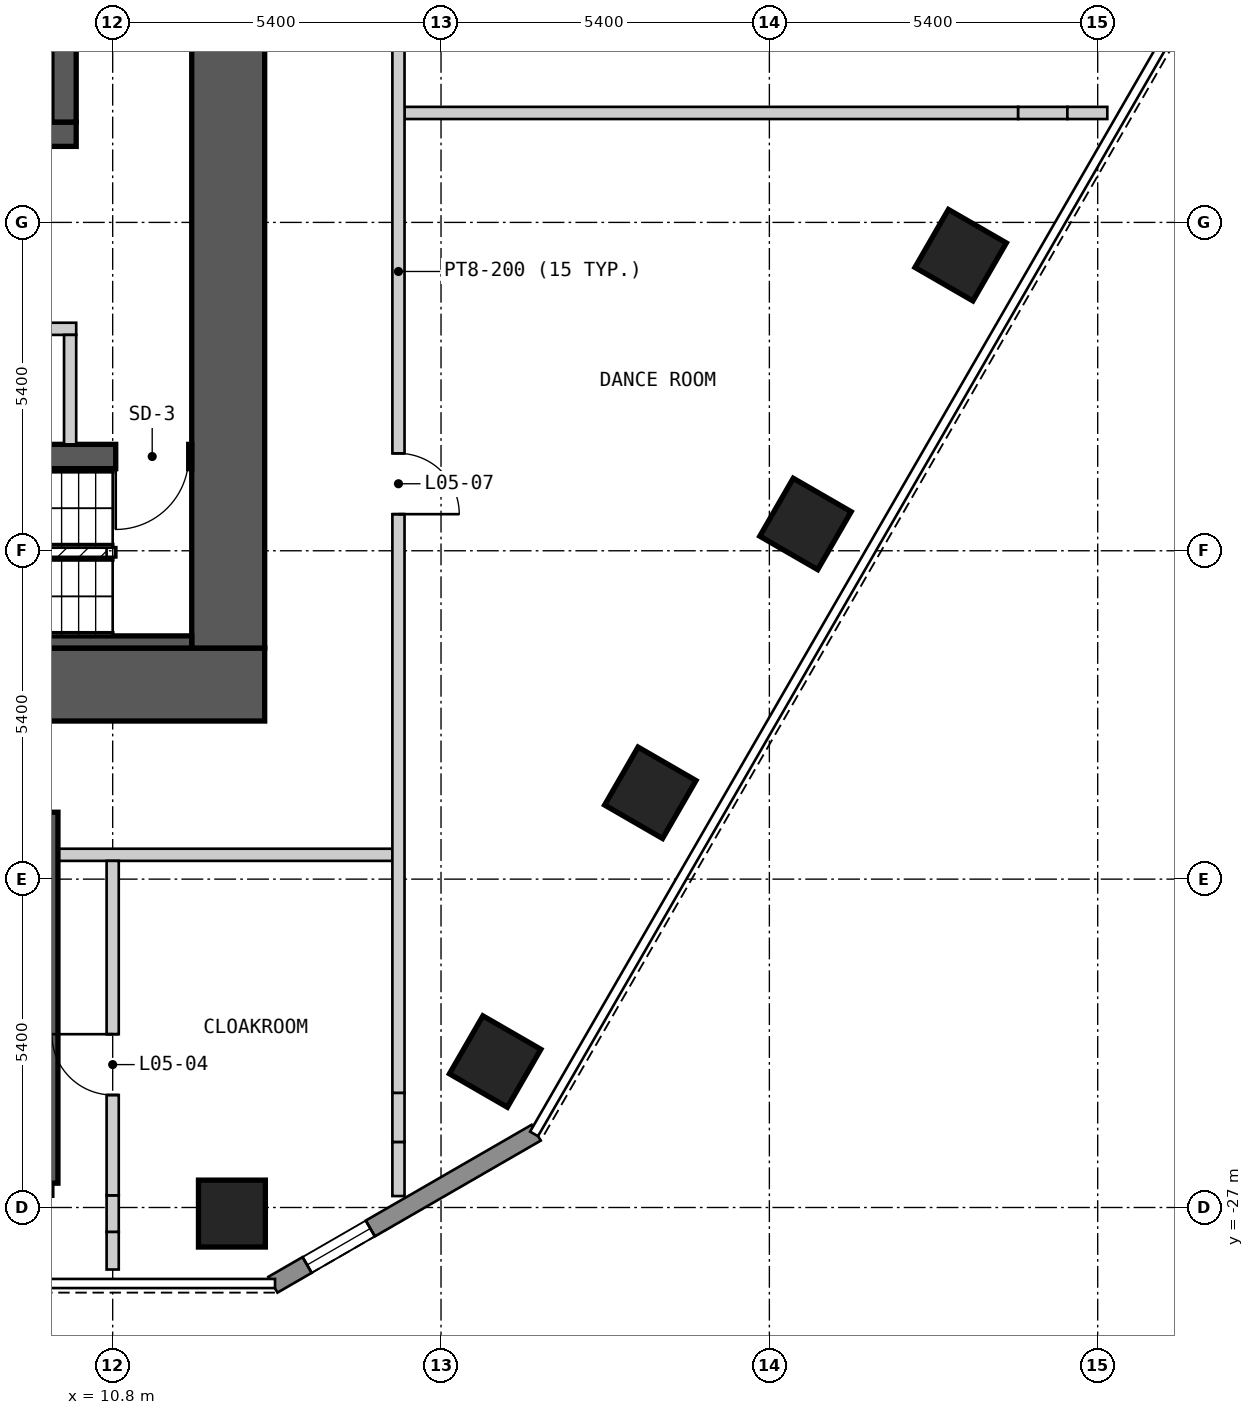
"""IFC4 building model, lengths in metres.
Left out: names, types, materials, properties, quantities, classifications, styles, units other than length and angle.
Written with IfcOpenShell. Run it as: python <this file> out.ifc"""

import sys

from ifc_helpers import new_model, si_unit, direction, frame, frame_2d, origin, origin_2d, place, context, subcontext, project, spatial, polyline, rectangle, outline, extrude, element, fill, save


model = new_model("IFC4")
c1 = context("Model", 3, precision=1e-05, world=origin(), true_north=direction((0.0, 1.0)))
c2 = subcontext(c1, "Body", "Model", "MODEL_VIEW")
j1 = project(units=[si_unit("LENGTHUNIT", "METRE"), si_unit("PLANEANGLEUNIT", "RADIAN")], contexts=[c1])
p1 = place(None, origin())
s1 = spatial("IfcSite", under=j1, at=p1, CompositionType="ELEMENT")
p2 = place(p1, origin())
s2 = spatial("IfcBuilding", under=s1, at=p2, CompositionType="ELEMENT")
p3 = place(p2, frame((0.0, 0.0, 19.8)))
s3 = spatial("IfcBuildingStorey", under=s2, at=p3, CompositionType="ELEMENT", Elevation=19.8)
for number, where, z_axis, x_axis in (
    (1, (12.761, -27.1, 0.0), (0.0, 0.0, 1.0), (1.0, 0.0, 0.0)),
    (2, (17.09, -24.6, 0.0), (0.0, 0.0, 1.0), (0.5, 0.866, 0.0)),
    (3, (19.642, -20.18, 0.0), (0.0, 0.0, 1.0), (0.5, 0.866, 0.0)),
    (4, (22.194, -15.759, 0.0), (0.0, 0.0, 1.0), (0.5, 0.866, 0.0)),
    (5, (24.746, -11.339, 0.0), (0.0, 0.0, 1.0), (0.5, 0.866, 0.0)),
):
    element("IfcColumn", number, at=place(p3, frame(where, z_axis=z_axis, x_axis=x_axis)), inside=s3, PredefinedType="COLUMN", context=c2, shape_type="SweptSolid", body=[
        extrude(rectangle(XDim=1.1, YDim=1.1, at=origin_2d()), origin(), (0.0, 0.0, 1.0), 3.6),
    ])
p4 = place(p3, frame((-13.3, -18.4, 0.0), z_axis=(0.0, 0.0, 1.0), x_axis=(1.0, 0.0, 0.0)))
e6 = element("IfcWall", 6, at=p4, inside=s3, PredefinedType="SHEAR", context=c2, shape_type="SweptSolid", body=[
    extrude(rectangle(XDim=26.6, YDim=1.2, at=frame_2d((13.3, 0.0))), origin(), (0.0, 0.0, 1.0), 2.8),
])
p5 = place(p3, frame((12.7, -17.8, 0.0), z_axis=(0.0, 0.0, 1.0), x_axis=(0.0, 1.0, 0.0)))
e7 = element("IfcWall", 7, at=p5, inside=s3, PredefinedType="SHEAR", context=c2, shape_type="SweptSolid", body=[
    extrude(rectangle(XDim=11.6, YDim=1.2, at=frame_2d((5.8, 0.0))), origin(), (0.0, 0.0, 1.0), 2.8),
])
p6 = place(p3, frame((-12.1, -14.65, 0.0), z_axis=(0.0, 0.0, 1.0), x_axis=(1.0, 0.0, 0.0)))
e8 = element("IfcWall", 8, at=p6, inside=s3, PredefinedType="SHEAR", context=c2, shape_type="SweptSolid", body=[
    extrude(rectangle(XDim=24.2, YDim=0.4, at=frame_2d((12.1, 0.0))), origin(), (0.0, 0.0, 1.0), 2.8),
])
p7 = place(p6, frame((1.3, 0.0, 0.0), z_axis=(0.0, 0.0, 1.0), x_axis=(-1.0, 0.0, 0.0)))
e9 = element("IfcOpeningElement", 9, at=p7, cuts=e8, PredefinedType="OPENING", context=c2, shape_type="SweptSolid", body=[
    extrude(rectangle(XDim=1.2, YDim=2.1, at=frame_2d((0.6, 1.05))), frame((0.0, 0.21, 0.0), z_axis=(0.0, -1.0, 0.0), x_axis=(1.0, 0.0, 0.0)), (0.0, 0.0, 1.0), 0.42),
])
p8 = place(p6, frame((24.15, 0.0, 0.0), z_axis=(0.0, 0.0, 1.0), x_axis=(-1.0, 0.0, 0.0)))
e10 = element("IfcOpeningElement", 10, at=p8, cuts=e8, PredefinedType="OPENING", context=c2, shape_type="SweptSolid", body=[
    extrude(rectangle(XDim=1.2, YDim=2.1, at=frame_2d((0.6, 1.05))), frame((0.0, 0.21, 0.0), z_axis=(0.0, -1.0, 0.0), x_axis=(1.0, 0.0, 0.0)), (0.0, 0.0, 1.0), 0.42),
])
p9 = place(p6, frame((16.25, 0.0, 0.0), z_axis=(0.0, 0.0, 1.0), x_axis=(-1.0, 0.0, 0.0)))
e11 = element("IfcOpeningElement", 11, at=p9, cuts=e8, PredefinedType="OPENING", context=c2, shape_type="SweptSolid", body=[
    extrude(rectangle(XDim=0.9, YDim=2.1, at=frame_2d((0.45, 1.05))), frame((0.0, 0.21, 0.0), z_axis=(0.0, -1.0, 0.0), x_axis=(1.0, 0.0, 0.0)), (0.0, 0.0, 1.0), 0.42),
])
p10 = place(p6, frame((18.05, 0.0, 0.0), z_axis=(0.0, 0.0, 1.0), x_axis=(-1.0, 0.0, 0.0)))
e12 = element("IfcOpeningElement", 12, at=p10, cuts=e8, PredefinedType="OPENING", context=c2, shape_type="SweptSolid", body=[
    extrude(rectangle(XDim=0.9, YDim=2.1, at=frame_2d((0.45, 1.05))), frame((0.0, 0.21, 0.0), z_axis=(0.0, -1.0, 0.0), x_axis=(1.0, 0.0, 0.0)), (0.0, 0.0, 1.0), 0.42),
])
p11 = place(p3, frame((-12.1, -9.35, 0.0), z_axis=(0.0, 0.0, 1.0), x_axis=(1.0, 0.0, 0.0)))
e13 = element("IfcWall", 13, at=p11, inside=s3, PredefinedType="SHEAR", context=c2, shape_type="SweptSolid", body=[
    extrude(rectangle(XDim=22.3, YDim=0.4, at=frame_2d((11.15, 0.0))), origin(), (0.0, 0.0, 1.0), 2.8),
])
p12 = place(p11, frame((0.7, 0.0, 0.0)))
e14 = element("IfcOpeningElement", 14, at=p12, cuts=e13, PredefinedType="OPENING", context=c2, shape_type="SweptSolid", body=[
    extrude(rectangle(XDim=1.1, YDim=2.1, at=frame_2d((0.55, 1.05))), frame((0.0, 0.21, 0.0), z_axis=(0.0, -1.0, 0.0), x_axis=(1.0, 0.0, 0.0)), (0.0, 0.0, 1.0), 0.42),
])
p13 = place(p11, frame((3.5, 0.0, 0.0)))
e15 = element("IfcOpeningElement", 15, at=p13, cuts=e13, PredefinedType="OPENING", context=c2, shape_type="SweptSolid", body=[
    extrude(rectangle(XDim=1.1, YDim=2.1, at=frame_2d((0.55, 1.05))), frame((0.0, 0.21, 0.0), z_axis=(0.0, -1.0, 0.0), x_axis=(1.0, 0.0, 0.0)), (0.0, 0.0, 1.0), 0.42),
])
p14 = place(p11, frame((6.3, 0.0, 0.0)))
e16 = element("IfcOpeningElement", 16, at=p14, cuts=e13, PredefinedType="OPENING", context=c2, shape_type="SweptSolid", body=[
    extrude(rectangle(XDim=1.1, YDim=2.1, at=frame_2d((0.55, 1.05))), frame((0.0, 0.21, 0.0), z_axis=(0.0, -1.0, 0.0), x_axis=(1.0, 0.0, 0.0)), (0.0, 0.0, 1.0), 0.42),
])
p15 = place(p11, frame((8.6, 0.0, 0.0)))
e17 = element("IfcOpeningElement", 17, at=p15, cuts=e13, PredefinedType="OPENING", context=c2, shape_type="SweptSolid", body=[
    extrude(rectangle(XDim=1.1, YDim=2.1, at=frame_2d((0.55, 1.05))), frame((0.0, 0.21, 0.0), z_axis=(0.0, -1.0, 0.0), x_axis=(1.0, 0.0, 0.0)), (0.0, 0.0, 1.0), 0.42),
])
p16 = place(p11, frame((10.9, 0.0, 0.0)))
e18 = element("IfcOpeningElement", 18, at=p16, cuts=e13, PredefinedType="OPENING", context=c2, shape_type="SweptSolid", body=[
    extrude(rectangle(XDim=1.1, YDim=2.1, at=frame_2d((0.55, 1.05))), frame((0.0, 0.21, 0.0), z_axis=(0.0, -1.0, 0.0), x_axis=(1.0, 0.0, 0.0)), (0.0, 0.0, 1.0), 0.42),
])
p17 = place(p11, frame((13.2, 0.0, 0.0)))
e19 = element("IfcOpeningElement", 19, at=p17, cuts=e13, PredefinedType="OPENING", context=c2, shape_type="SweptSolid", body=[
    extrude(rectangle(XDim=1.1, YDim=2.1, at=frame_2d((0.55, 1.05))), frame((0.0, 0.21, 0.0), z_axis=(0.0, -1.0, 0.0), x_axis=(1.0, 0.0, 0.0)), (0.0, 0.0, 1.0), 0.42),
])
p18 = place(p11, frame((15.5, 0.0, 0.0)))
e20 = element("IfcOpeningElement", 20, at=p18, cuts=e13, PredefinedType="OPENING", context=c2, shape_type="SweptSolid", body=[
    extrude(rectangle(XDim=1.1, YDim=2.1, at=frame_2d((0.55, 1.05))), frame((0.0, 0.21, 0.0), z_axis=(0.0, -1.0, 0.0), x_axis=(1.0, 0.0, 0.0)), (0.0, 0.0, 1.0), 0.42),
])
p19 = place(p11, frame((17.8, 0.0, 0.0)))
e21 = element("IfcOpeningElement", 21, at=p19, cuts=e13, PredefinedType="OPENING", context=c2, shape_type="SweptSolid", body=[
    extrude(rectangle(XDim=1.1, YDim=2.1, at=frame_2d((0.55, 1.05))), frame((0.0, 0.21, 0.0), z_axis=(0.0, -1.0, 0.0), x_axis=(1.0, 0.0, 0.0)), (0.0, 0.0, 1.0), 0.42),
])
p20 = place(p11, frame((20.2, 0.0, 0.0)))
e22 = element("IfcOpeningElement", 22, at=p20, cuts=e13, PredefinedType="OPENING", context=c2, shape_type="SweptSolid", body=[
    extrude(rectangle(XDim=1.1, YDim=2.1, at=frame_2d((0.55, 1.05))), frame((0.0, 0.21, 0.0), z_axis=(0.0, -1.0, 0.0), x_axis=(1.0, 0.0, 0.0)), (0.0, 0.0, 1.0), 0.42),
])
p21 = place(p3, frame((10.0, -9.15, 0.0), z_axis=(0.0, 0.0, 1.0), x_axis=(0.0, 1.0, 0.0)))
e23 = element("IfcWall", 23, at=p21, inside=s3, PredefinedType="SHEAR", context=c2, shape_type="SweptSolid", body=[
    extrude(rectangle(XDim=2.95, YDim=0.4, at=frame_2d((1.475, 0.0))), origin(), (0.0, 0.0, 1.0), 2.8),
])
p22 = place(p3, frame((13.435, -28.27, 0.0), z_axis=(0.0, 0.0, 1.0), x_axis=(0.866010750942, 0.50002537861, 0.0)))
e24 = element("IfcWall", 24, at=p22, inside=s3, PredefinedType="SOLIDWALL", context=c2, shape_type="SweptSolid", body=[
    extrude(outline(polyline([(0.0, -0.15), (5.0, -0.15), (4.919, 0.15), (0.08, 0.15), (0.0, -0.15)])), origin(), (0.0, 0.0, 1.0), 2.8),
])
p23 = place(p22, frame((0.65, 0.0, 0.15)))
e25 = element("IfcOpeningElement", 25, at=p23, cuts=e24, PredefinedType="OPENING", context=c2, shape_type="SweptSolid", body=[
    extrude(rectangle(XDim=1.2, YDim=2.1, at=frame_2d((0.6, 1.05))), frame((0.0, 0.16, 0.0), z_axis=(0.0, -1.0, 0.0), x_axis=(1.0, 0.0, 0.0)), (0.0, 0.0, 1.0), 0.32),
])
p24 = place(p3, frame((5.65, -26.7, 0.0), z_axis=(0.0, 0.0, 1.0), x_axis=(1.0, 0.0, 0.0)))
e26 = element("IfcWall", 26, at=p24, inside=s3, PredefinedType="SOLIDWALL", context=c2, shape_type="SweptSolid", body=[
    extrude(rectangle(XDim=4.15, YDim=0.2, at=frame_2d((2.075, 0.0))), origin(), (0.0, 0.0, 1.0), 2.8),
])
p25 = place(p3, frame((9.7, -21.2, 0.0), z_axis=(0.0, 0.0, 1.0), x_axis=(1.0, 0.0, 0.0)))
e27 = element("IfcWall", 27, at=p25, inside=s3, PredefinedType="PARTITIONING", context=c2, shape_type="SweptSolid", body=[
    extrude(rectangle(XDim=5.7, YDim=0.2, at=frame_2d((2.85, 0.0))), origin(), (0.0, 0.0, 1.0), 2.8),
])
p26 = place(p3, frame((15.6, -9.0, 0.0), z_axis=(0.0, 0.0, 1.0), x_axis=(1.0, 0.0, 0.0)))
e28 = element("IfcWall", 28, at=p26, inside=s3, PredefinedType="PARTITIONING", context=c2, shape_type="SweptSolid", body=[
    extrude(rectangle(XDim=10.092, YDim=0.2, at=frame_2d((5.046, 0.0))), origin(), (0.0, 0.0, 1.0), 2.8),
])
p27 = place(p3, frame((25.692, -9.0, 0.0), z_axis=(0.0, 0.0, 1.0), x_axis=(1.0, 0.0, 0.0)))
e29 = element("IfcWall", 29, at=p27, inside=s3, PredefinedType="PARTITIONING", context=c2, shape_type="SweptSolid", body=[
    extrude(rectangle(XDim=0.809, YDim=0.2, at=frame_2d((0.405, 0.0))), origin(), (0.0, 0.0, 1.0), 2.07),
])
p28 = place(p3, frame((26.501, -9.0, 0.0), z_axis=(0.0, 0.0, 1.0), x_axis=(1.0, 0.0, 0.0)))
e30 = element("IfcWall", 30, at=p28, inside=s3, PredefinedType="PARTITIONING", context=c2, shape_type="SweptSolid", body=[
    extrude(rectangle(XDim=0.657, YDim=0.2, at=frame_2d((0.329, 0.0))), origin(), (0.0, 0.0, 1.0), 2.8),
])
p29 = place(p3, frame((9.8, -26.6, 0.0), z_axis=(0.0, 0.0, 1.0), x_axis=(0.0, 1.0, 0.0)))
e31 = element("IfcWall", 31, at=p29, inside=s3, PredefinedType="SOLIDWALL", context=c2, shape_type="SweptSolid", body=[
    extrude(rectangle(XDim=6.1, YDim=0.2, at=frame_2d((3.05, 0.0))), origin(), (0.0, 0.0, 1.0), 2.8),
])
p30 = place(p3, frame((10.8, -28.02, 0.0), z_axis=(0.0, 0.0, 1.0), x_axis=(0.0, 1.0, 0.0)))
e32 = element("IfcWall", 32, at=p30, inside=s3, PredefinedType="PARTITIONING", context=c2, shape_type="SweptSolid", body=[
    extrude(rectangle(XDim=0.62, YDim=0.2, at=frame_2d((0.31, 0.0))), origin(), (0.0, 0.0, 1.0), 2.8),
])
p31 = place(p3, frame((10.8, -27.4, 0.0), z_axis=(0.0, 0.0, 1.0), x_axis=(0.0, 1.0, 0.0)))
e33 = element("IfcWall", 33, at=p31, inside=s3, PredefinedType="PARTITIONING", context=c2, shape_type="SweptSolid", body=[
    extrude(rectangle(XDim=0.6, YDim=0.2, at=frame_2d((0.3, 0.0))), origin(), (0.0, 0.0, 1.0), 2.07),
])
p32 = place(p3, frame((10.8, -26.8, 0.0), z_axis=(0.0, 0.0, 1.0), x_axis=(0.0, 1.0, 0.0)))
e34 = element("IfcWall", 34, at=p32, inside=s3, PredefinedType="PARTITIONING", context=c2, shape_type="SweptSolid", body=[
    extrude(rectangle(XDim=5.5, YDim=0.2, at=frame_2d((2.75, 0.0))), origin(), (0.0, 0.0, 1.0), 2.8),
])
p33 = place(p32, frame((2.65, 0.0, 0.0), z_axis=(0.0, 0.0, 1.0), x_axis=(-1.0, 0.0, 0.0)))
e35 = element("IfcOpeningElement", 35, at=p33, cuts=e34, PredefinedType="OPENING", context=c2, shape_type="SweptSolid", body=[
    extrude(rectangle(XDim=1.0, YDim=2.1, at=frame_2d((0.5, 1.05))), frame((0.0, 0.11, 0.0), z_axis=(0.0, -1.0, 0.0), x_axis=(1.0, 0.0, 0.0)), (0.0, 0.0, 1.0), 0.22),
])
p34 = place(p3, frame((15.5, -26.812, 0.0), z_axis=(0.0, 0.0, 1.0), x_axis=(0.0, 1.0, 0.0)))
e36 = element("IfcWall", 36, at=p34, inside=s3, PredefinedType="PARTITIONING", context=c2, shape_type="SweptSolid", body=[
    extrude(rectangle(XDim=0.89, YDim=0.2, at=frame_2d((0.445, 0.0))), origin(), (0.0, 0.0, 1.0), 2.8),
])
p35 = place(p3, frame((15.5, -25.922, 0.0), z_axis=(0.0, 0.0, 1.0), x_axis=(0.0, 1.0, 0.0)))
e37 = element("IfcWall", 37, at=p35, inside=s3, PredefinedType="PARTITIONING", context=c2, shape_type="SweptSolid", body=[
    extrude(rectangle(XDim=0.808, YDim=0.2, at=frame_2d((0.404, 0.0))), origin(), (0.0, 0.0, 1.0), 2.07),
])
p36 = place(p3, frame((15.5, -25.114, 0.0), z_axis=(0.0, 0.0, 1.0), x_axis=(0.0, 1.0, 0.0)))
e38 = element("IfcWall", 38, at=p36, inside=s3, PredefinedType="PARTITIONING", context=c2, shape_type="SweptSolid", body=[
    extrude(rectangle(XDim=27.014, YDim=0.2, at=frame_2d((13.507, 0.0))), origin(), (0.0, 0.0, 1.0), 2.8),
])
p37 = place(p36, frame((10.516, 0.0, 0.0), z_axis=(0.0, 0.0, 1.0), x_axis=(-1.0, 0.0, 0.0)))
e39 = element("IfcOpeningElement", 39, at=p37, cuts=e38, PredefinedType="OPENING", context=c2, shape_type="SweptSolid", body=[
    extrude(rectangle(XDim=1.0, YDim=2.1, at=frame_2d((0.5, 1.05))), frame((0.0, 0.11, 0.0), z_axis=(0.0, -1.0, 0.0), x_axis=(1.0, 0.0, 0.0)), (0.0, 0.0, 1.0), 0.22),
])
p38 = place(p36, frame((22.112, 0.0, 0.0), z_axis=(0.0, 0.0, 1.0), x_axis=(-1.0, 0.0, 0.0)))
e40 = element("IfcOpeningElement", 40, at=p38, cuts=e38, PredefinedType="OPENING", context=c2, shape_type="SweptSolid", body=[
    extrude(rectangle(XDim=1.0, YDim=2.1, at=frame_2d((0.5, 1.05))), frame((0.0, 0.11, 0.0), z_axis=(0.0, -1.0, 0.0), x_axis=(1.0, 0.0, 0.0)), (0.0, 0.0, 1.0), 0.22),
])
p39 = place(p3, frame((6.7, -17.7, 0.0), z_axis=(0.0, 0.0, 1.0), x_axis=(1.0, 0.0, 0.0)))
e41 = element("IfcWall", 41, at=p39, inside=s3, PredefinedType="SOLIDWALL", context=c2, shape_type="SweptSolid", body=[
    extrude(rectangle(XDim=5.4, YDim=0.2, at=frame_2d((2.7, 0.0))), origin(), (0.0, 0.0, 1.0), 2.8),
])
p40 = place(p3, frame((6.9, -12.55, 0.0), z_axis=(0.0, 0.0, 1.0), x_axis=(1.0, 0.0, 0.0)))
e42 = element("IfcWall", 42, at=p40, inside=s3, PredefinedType="PARTITIONING", context=c2, shape_type="SweptSolid", body=[
    extrude(rectangle(XDim=3.3, YDim=0.2, at=frame_2d((1.65, 0.0))), origin(), (0.0, 0.0, 1.0), 2.8),
])
p41 = place(p40, frame((2.05, 0.0, 0.0), z_axis=(0.0, 0.0, 1.0), x_axis=(-1.0, 0.0, 0.0)))
e43 = element("IfcOpeningElement", 43, at=p41, cuts=e42, PredefinedType="OPENING", context=c2, shape_type="SweptSolid", body=[
    extrude(rectangle(XDim=1.0, YDim=2.1, at=frame_2d((0.5, 1.05))), frame((0.0, 0.11, 0.0), z_axis=(0.0, -1.0, 0.0), x_axis=(1.0, 0.0, 0.0)), (0.0, 0.0, 1.0), 0.22),
])
p42 = place(p3, frame((10.1, -14.45, 0.0), z_axis=(0.0, 0.0, 1.0), x_axis=(0.0, 1.0, 0.0)))
e44 = element("IfcWall", 44, at=p42, inside=s3, PredefinedType="PARTITIONING", context=c2, shape_type="SweptSolid", body=[
    extrude(rectangle(XDim=1.8, YDim=0.2, at=frame_2d((0.9, 0.0))), origin(), (0.0, 0.0, 1.0), 2.8),
])
p43 = place(p23, origin())
e45 = element("IfcWindow", 45, at=p43, inside=s3, PartitioningType="SINGLE_PANEL", PredefinedType="WINDOW", context=c2, shape_type="SweptSolid", body=[
    extrude(rectangle(XDim=1.2, YDim=2.1, at=frame_2d((0.6, 1.05))), frame((0.0, 0.03, 0.0), z_axis=(0.0, -1.0, 0.0), x_axis=(1.0, 0.0, 0.0)), (0.0, 0.0, 1.0), 0.06),
])
fill(e25, e45)
p44 = place(p33, origin())
e46 = element("IfcDoor", 46, at=p44, inside=s3, OperationType="SINGLE_SWING_LEFT", PredefinedType="DOOR", context=c2, shape_type="SweptSolid", body=[
    extrude(rectangle(XDim=1.0, YDim=2.1, at=frame_2d((0.5, 1.05))), frame((0.0, 0.025, 0.0), z_axis=(0.0, -1.0, 0.0), x_axis=(1.0, 0.0, 0.0)), (0.0, 0.0, 1.0), 0.05),
])
fill(e35, e46)
p45 = place(p37, origin())
e47 = element("IfcDoor", 47, at=p45, inside=s3, OperationType="SINGLE_SWING_RIGHT", PredefinedType="DOOR", context=c2, shape_type="SweptSolid", body=[
    extrude(rectangle(XDim=1.0, YDim=2.1, at=frame_2d((0.5, 1.05))), frame((0.0, 0.025, 0.0), z_axis=(0.0, -1.0, 0.0), x_axis=(1.0, 0.0, 0.0)), (0.0, 0.0, 1.0), 0.05),
])
fill(e39, e47)
p46 = place(p8, origin())
e48 = element("IfcDoor", 48, at=p46, inside=s3, OperationType="SINGLE_SWING_RIGHT", PredefinedType="DOOR", context=c2, shape_type="SweptSolid", body=[
    extrude(rectangle(XDim=1.2, YDim=2.1, at=frame_2d((0.6, 1.05))), frame((0.0, 0.025, 0.0), z_axis=(0.0, -1.0, 0.0), x_axis=(1.0, 0.0, 0.0)), (0.0, 0.0, 1.0), 0.05),
])
fill(e10, e48)
save(model, sys.argv[1])
